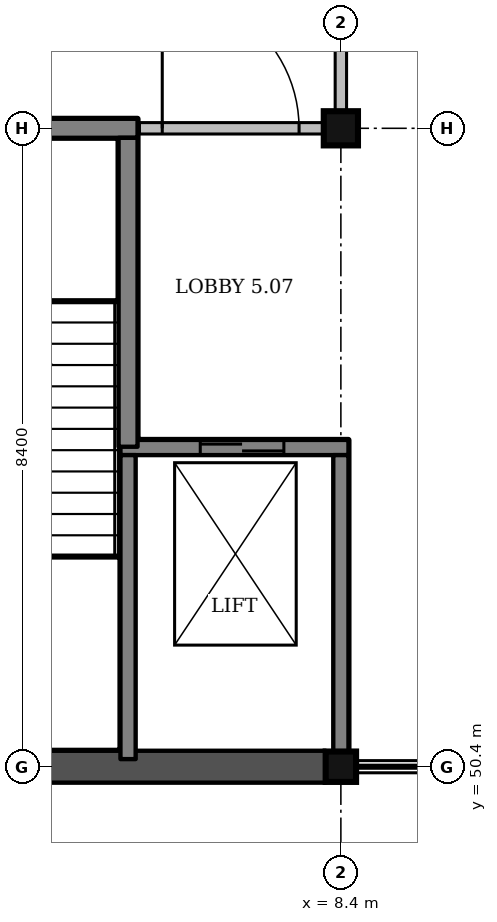
"""IFC4 building model, lengths in metres.
Left out: names, types, materials, properties, quantities, classifications, styles, units other than length and angle.
Written with IfcOpenShell. Run it as: python <this file> out.ifc"""

import sys

from ifc_helpers import new_model, si_unit, direction, frame, frame_2d, origin, origin_2d, place, context, subcontext, project, spatial, rectangle, extrude, element, fill, save


model = new_model("IFC4")
c1 = context("Model", 3, precision=1e-05, world=origin(), true_north=direction((0.0, 1.0)))
c2 = subcontext(c1, "Body", "Model", "MODEL_VIEW")
j1 = project(units=[si_unit("LENGTHUNIT", "METRE"), si_unit("PLANEANGLEUNIT", "RADIAN")], contexts=[c1])
p1 = place(None, origin())
s1 = spatial("IfcSite", under=j1, at=p1, CompositionType="ELEMENT")
p2 = place(p1, origin())
s2 = spatial("IfcBuilding", under=s1, at=p2, CompositionType="ELEMENT")
p3 = place(p2, frame((0.0, 0.0, 22.5)))
s3 = spatial("IfcBuildingStorey", under=s2, at=p3, CompositionType="ELEMENT", Elevation=22.5)
p4 = place(p3, frame((8.4, 50.4, 0.0), z_axis=(0.0, 0.0, 1.0), x_axis=(1.0, 0.0, 0.0)))
e1 = element("IfcColumn", 1, at=p4, inside=s3, PredefinedType="COLUMN", context=c2, shape_type="SweptSolid", body=[
    extrude(rectangle(XDim=0.4, YDim=0.4, at=origin_2d()), origin(), (0.0, 0.0, 1.0), 4.5),
])
p5 = place(p3, frame((8.4, 58.8, 0.0), z_axis=(0.0, 0.0, 1.0), x_axis=(1.0, 0.0, 0.0)))
e2 = element("IfcColumn", 2, at=p5, inside=s3, PredefinedType="COLUMN", context=c2, shape_type="SweptSolid", body=[
    extrude(rectangle(XDim=0.45, YDim=0.45, at=origin_2d()), origin(), (0.0, 0.0, 1.0), 4.5),
])
p6 = place(p3, frame((5.5, 54.6, 0.0), z_axis=(0.0, 0.0, 1.0), x_axis=(1.0, 0.0, 0.0)))
e3 = element("IfcWall", 3, at=p6, inside=s3, PredefinedType="SHEAR", context=c2, shape_type="SweptSolid", body=[
    extrude(rectangle(XDim=3.0, YDim=0.2, at=frame_2d((1.5, 0.0))), origin(), (0.0, 0.0, 1.0), 4.5),
])
p7 = place(p6, frame((1.05, 0.0, 0.0)))
e4 = element("IfcOpeningElement", 4, at=p7, cuts=e3, PredefinedType="OPENING", context=c2, shape_type="SweptSolid", body=[
    extrude(rectangle(XDim=1.1, YDim=2.1, at=frame_2d((0.55, 1.05))), frame((0.0, 0.11, 0.0), z_axis=(0.0, -1.0, 0.0), x_axis=(1.0, 0.0, 0.0)), (0.0, 0.0, 1.0), 0.22),
])
p8 = place(p3, frame((5.6, 50.5, 0.0), z_axis=(0.0, 0.0, 1.0), x_axis=(0.0, 1.0, 0.0)))
e5 = element("IfcWall", 5, at=p8, inside=s3, PredefinedType="SHEAR", context=c2, shape_type="SweptSolid", body=[
    extrude(rectangle(XDim=4.0, YDim=0.2, at=frame_2d((2.0, 0.0))), origin(), (0.0, 0.0, 1.0), 4.5),
])
p9 = place(p3, frame((8.4, 50.6, 0.0), z_axis=(0.0, 0.0, 1.0), x_axis=(0.0, 1.0, 0.0)))
e6 = element("IfcWall", 6, at=p9, inside=s3, PredefinedType="SHEAR", context=c2, shape_type="SweptSolid", body=[
    extrude(rectangle(XDim=3.9, YDim=0.2, at=frame_2d((1.95, 0.0))), origin(), (0.0, 0.0, 1.0), 4.5),
])
p10 = place(p3, frame((0.2, 58.8, 0.0), z_axis=(0.0, 0.0, 1.0), x_axis=(1.0, 0.0, 0.0)))
e7 = element("IfcWall", 7, at=p10, inside=s3, PredefinedType="SHEAR", context=c2, shape_type="SweptSolid", body=[
    extrude(rectangle(XDim=5.525, YDim=0.25, at=frame_2d((2.763, 0.0))), origin(), (0.0, 0.0, 1.0), 4.5),
])
p11 = place(p10, frame((2.15, 0.0, 0.0)))
e8 = element("IfcOpeningElement", 8, at=p11, cuts=e7, PredefinedType="OPENING", context=c2, shape_type="SweptSolid", body=[
    extrude(rectangle(XDim=1.0, YDim=2.1, at=frame_2d((0.5, 1.05))), frame((0.0, 0.135, 0.0), z_axis=(0.0, -1.0, 0.0), x_axis=(1.0, 0.0, 0.0)), (0.0, 0.0, 1.0), 0.27),
])
p12 = place(p3, frame((5.6, 54.61, 0.0), z_axis=(0.0, 0.0, 1.0), x_axis=(0.0, 1.0, 0.0)))
e9 = element("IfcWall", 9, at=p12, inside=s3, PredefinedType="SHEAR", context=c2, shape_type="SweptSolid", body=[
    extrude(rectangle(XDim=4.065, YDim=0.25, at=frame_2d((2.032, 0.0))), origin(), (0.0, 0.0, 1.0), 4.5),
])
p13 = place(p3, frame((4.5, 50.4, 0.0), z_axis=(0.0, 0.0, 1.0), x_axis=(1.0, 0.0, 0.0)))
e10 = element("IfcWall", 10, at=p13, inside=s3, PredefinedType="SOLIDWALL", context=c2, shape_type="SweptSolid", body=[
    extrude(rectangle(XDim=3.7, YDim=0.42, at=frame_2d((1.85, 0.0))), origin(), (0.0, 0.0, 1.0), 3.65),
])
p14 = place(p3, frame((5.75, 58.8, 0.0), z_axis=(0.0, 0.0, 1.0), x_axis=(1.0, 0.0, 0.0)))
e11 = element("IfcWall", 11, at=p14, inside=s3, PredefinedType="PARTITIONING", context=c2, shape_type="SweptSolid", body=[
    extrude(rectangle(XDim=2.425, YDim=0.15, at=frame_2d((1.212, 0.0))), origin(), (0.0, 0.0, 1.0), 3.4),
])
p15 = place(p14, frame((0.3, 0.0, 0.0)))
e12 = element("IfcOpeningElement", 12, at=p15, cuts=e11, PredefinedType="OPENING", context=c2, shape_type="SweptSolid", body=[
    extrude(rectangle(XDim=1.8, YDim=2.1, at=frame_2d((0.9, 1.05))), frame((0.0, 0.085, 0.0), z_axis=(0.0, -1.0, 0.0), x_axis=(1.0, 0.0, 0.0)), (0.0, 0.0, 1.0), 0.17),
])
p16 = place(p3, frame((8.4, 59.025, 0.0), z_axis=(0.0, 0.0, 1.0), x_axis=(0.0, 1.0, 0.0)))
e13 = element("IfcWall", 13, at=p16, inside=s3, PredefinedType="PARTITIONING", context=c2, shape_type="SweptSolid", body=[
    extrude(rectangle(XDim=7.95, YDim=0.15, at=frame_2d((3.975, 0.0))), origin(), (0.0, 0.0, 1.0), 3.4),
])
p17 = place(p15, origin())
e14 = element("IfcDoor", 14, at=p17, inside=s3, OperationType="DOUBLE_DOOR_SINGLE_SWING", PredefinedType="DOOR", context=c2, shape_type="SweptSolid", body=[
    extrude(rectangle(XDim=1.8, YDim=2.1, at=frame_2d((0.9, 1.05))), frame((0.0, 0.025, 0.0), z_axis=(0.0, -1.0, 0.0), x_axis=(1.0, 0.0, 0.0)), (0.0, 0.0, 1.0), 0.05),
])
fill(e12, e14)
p18 = place(p7, origin())
e15 = element("IfcDoor", 15, at=p18, inside=s3, OperationType="SLIDING_TO_RIGHT", PredefinedType="DOOR", context=c2, shape_type="SweptSolid", body=[
    extrude(rectangle(XDim=1.1, YDim=2.1, at=frame_2d((0.55, 1.05))), frame((0.0, 0.025, 0.0), z_axis=(0.0, -1.0, 0.0), x_axis=(1.0, 0.0, 0.0)), (0.0, 0.0, 1.0), 0.05),
])
fill(e4, e15)
save(model, sys.argv[1])
